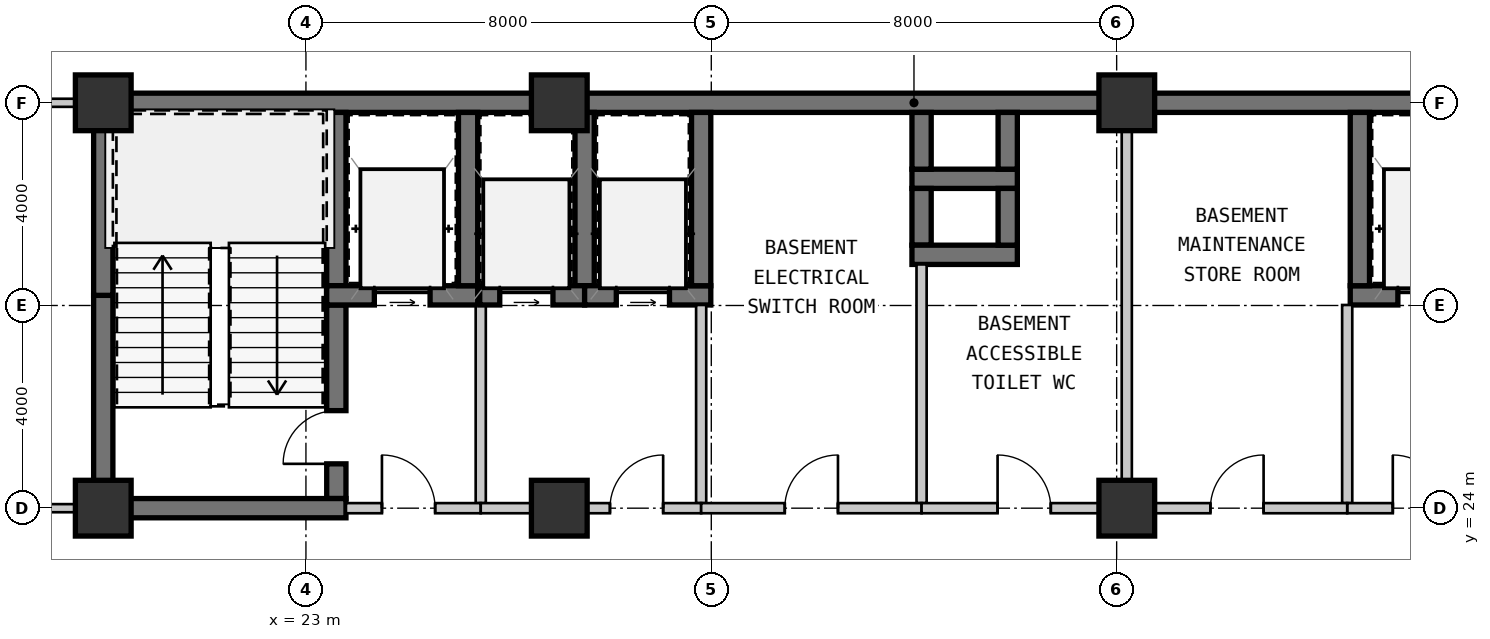
"""IFC4 building model, lengths in metres.
Left out: names, types, materials, properties, quantities, classifications, styles, units other than length and angle.
Written with IfcOpenShell. Run it as: python <this file> out.ifc"""

import sys

from ifc_helpers import new_model, si_unit, direction, frame, frame_2d, origin, origin_2d, place, context, subcontext, project, spatial, rectangle, extrude, source, transform, mapped, element, fill, save


model = new_model("IFC4")
c1 = context("Model", 3, precision=1e-05, world=origin(), true_north=direction((0.0, 1.0)))
c2 = subcontext(c1, "Body", "Model", "MODEL_VIEW")
j1 = project(units=[si_unit("LENGTHUNIT", "METRE"), si_unit("PLANEANGLEUNIT", "RADIAN")], contexts=[c1])
p1 = place(None, origin())
s1 = spatial("IfcSite", under=j1, at=p1, CompositionType="ELEMENT")
p2 = place(p1, origin())
s2 = spatial("IfcBuilding", under=s1, at=p2, CompositionType="ELEMENT")
p3 = place(p2, frame((0.0, 0.0, -4.0)))
s3 = spatial("IfcBuildingStorey", under=s2, at=p3, CompositionType="ELEMENT", Elevation=-4.0)
m1 = source(origin(), c2, "Body", "SweptSolid", [
    extrude(rectangle(XDim=1.1, YDim=1.1, at=origin_2d()), origin(), (0.0, 0.0, 1.0), 4.0),
])
for number, where, z_axis, x_axis in (
    (1, (19.0, 24.0, 0.0), (0.0, 0.0, 1.0), (1.0, 0.0, 0.0)),
    (2, (28.0, 24.0, 0.0), (0.0, 0.0, 1.0), (1.0, 0.0, 0.0)),
    (3, (39.2, 24.0, 0.0), (0.0, 0.0, 1.0), (1.0, 0.0, 0.0)),
    (4, (19.0, 32.0, 0.0), (0.0, 0.0, 1.0), (1.0, 0.0, 0.0)),
    (5, (28.0, 32.0, 0.0), (0.0, 0.0, 1.0), (1.0, 0.0, 0.0)),
    (6, (39.2, 32.0, 0.0), (0.0, 0.0, 1.0), (1.0, 0.0, 0.0)),
):
    element("IfcColumn", number, at=place(p3, frame(where, z_axis=z_axis, x_axis=x_axis)), inside=s3, PredefinedType="COLUMN", context=c2, shape_type="MappedRepresentation", body=[
        mapped(m1, transform((0.0, 0.0, 0.0), scale=1.0)),
    ])
m2 = source(origin(), c2, "Body", "SweptSolid", [
    extrude(rectangle(XDim=9.19, YDim=0.38, at=frame_2d((4.595, 0.0))), origin(), (0.0, 0.0, 1.0), 3.74),
])
p4 = place(p3, frame((18.81, 32.0, 0.0), z_axis=(0.0, 0.0, 1.0), x_axis=(1.0, 0.0, 0.0)))
e7 = element("IfcWall", 7, at=p4, inside=s3, PredefinedType="SHEAR", context=c2, shape_type="MappedRepresentation", body=[
    mapped(m2, transform((0.0, 0.0, 0.0), scale=1.0)),
])
m3 = source(origin(), c2, "Body", "SweptSolid", [
    extrude(rectangle(XDim=11.2, YDim=0.38, at=frame_2d((5.6, 0.0))), origin(), (0.0, 0.0, 1.0), 3.74),
])
p5 = place(p3, frame((28.0, 32.0, 0.0), z_axis=(0.0, 0.0, 1.0), x_axis=(1.0, 0.0, 0.0)))
e8 = element("IfcWall", 8, at=p5, inside=s3, PredefinedType="SHEAR", context=c2, shape_type="MappedRepresentation", body=[
    mapped(m3, transform((0.0, 0.0, 0.0), scale=1.0)),
])
m4 = source(origin(), c2, "Body", "SweptSolid", [
    extrude(rectangle(XDim=11.99, YDim=0.38, at=frame_2d((5.995, 0.0))), origin(), (0.0, 0.0, 1.0), 3.74),
])
p6 = place(p3, frame((39.2, 32.0, 0.0), z_axis=(0.0, 0.0, 1.0), x_axis=(1.0, 0.0, 0.0)))
e9 = element("IfcWall", 9, at=p6, inside=s3, PredefinedType="SHEAR", context=c2, shape_type="MappedRepresentation", body=[
    mapped(m4, transform((0.0, 0.0, 0.0), scale=1.0)),
])
m5 = source(origin(), c2, "Body", "SweptSolid", [
    extrude(rectangle(XDim=4.01, YDim=0.38, at=frame_2d((2.005, 0.0))), origin(), (0.0, 0.0, 1.0), 3.74),
])
p7 = place(p3, frame((19.0, 24.19, 0.0), z_axis=(0.0, 0.0, 1.0), x_axis=(0.0, 1.0, 0.0)))
e10 = element("IfcWall", 10, at=p7, inside=s3, PredefinedType="SHEAR", context=c2, shape_type="MappedRepresentation", body=[
    mapped(m5, transform((0.0, 0.0, 0.0), scale=1.0)),
])
m6 = source(origin(), c2, "Body", "SweptSolid", [
    extrude(rectangle(XDim=3.61, YDim=0.38, at=frame_2d((1.805, 0.0))), origin(), (0.0, 0.0, 1.0), 3.74),
])
p8 = place(p3, frame((19.0, 28.2, 0.0), z_axis=(0.0, 0.0, 1.0), x_axis=(0.0, 1.0, 0.0)))
e11 = element("IfcWall", 11, at=p8, inside=s3, PredefinedType="SHEAR", context=c2, shape_type="MappedRepresentation", body=[
    mapped(m6, transform((0.0, 0.0, 0.0), scale=1.0)),
])
m7 = source(origin(), c2, "Body", "SweptSolid", [
    extrude(rectangle(XDim=3.42, YDim=0.38, at=frame_2d((1.71, 0.0))), origin(), (0.0, 0.0, 1.0), 3.74),
])
p9 = place(p3, frame((23.6, 28.39, 0.0), z_axis=(0.0, 0.0, 1.0), x_axis=(0.0, 1.0, 0.0)))
e12 = element("IfcWall", 12, at=p9, inside=s3, PredefinedType="SHEAR", context=c2, shape_type="MappedRepresentation", body=[
    mapped(m7, transform((0.0, 0.0, 0.0), scale=1.0)),
])
m8 = source(origin(), c2, "Body", "SweptSolid", [
    extrude(rectangle(XDim=3.82, YDim=0.38, at=frame_2d((1.91, 0.0))), origin(), (0.0, 0.0, 1.0), 3.74),
])
p10 = place(p3, frame((23.6, 24.19, 0.0), z_axis=(0.0, 0.0, 1.0), x_axis=(0.0, 1.0, 0.0)))
e13 = element("IfcWall", 13, at=p10, inside=s3, PredefinedType="SHEAR", context=c2, shape_type="MappedRepresentation", body=[
    mapped(m8, transform((0.0, 0.0, 0.0), scale=1.0)),
])
m9 = source(origin(), c2, "Body", "SweptSolid", [
    extrude(rectangle(XDim=1.05, YDim=2.1, at=frame_2d((0.525, 1.05))), frame((0.0, 0.2, 0.0), z_axis=(0.0, -1.0, 0.0), x_axis=(1.0, 0.0, 0.0)), (0.0, 0.0, 1.0), 0.4),
])
p11 = place(p10, frame((0.685, 0.0, 0.0)))
e14 = element("IfcOpeningElement", 14, at=p11, cuts=e13, PredefinedType="OPENING", context=c2, shape_type="MappedRepresentation", body=[
    mapped(m9, transform((0.0, 0.0, 0.0), scale=1.0)),
])
m10 = source(origin(), c2, "Body", "SweptSolid", [
    extrude(rectangle(XDim=4.98, YDim=0.38, at=frame_2d((2.49, 0.0))), origin(), (0.0, 0.0, 1.0), 3.74),
])
p12 = place(p3, frame((18.81, 24.0, 0.0), z_axis=(0.0, 0.0, 1.0), x_axis=(1.0, 0.0, 0.0)))
e15 = element("IfcWall", 15, at=p12, inside=s3, PredefinedType="SHEAR", context=c2, shape_type="MappedRepresentation", body=[
    mapped(m10, transform((0.0, 0.0, 0.0), scale=1.0)),
])
m11 = source(origin(), c2, "Body", "SweptSolid", [
    extrude(rectangle(XDim=2.98, YDim=0.38, at=frame_2d((1.49, 0.0))), origin(), (0.0, 0.0, 1.0), 3.74),
])
p13 = place(p3, frame((23.41, 28.2, 0.0), z_axis=(0.0, 0.0, 1.0), x_axis=(1.0, 0.0, 0.0)))
e16 = element("IfcWall", 16, at=p13, inside=s3, PredefinedType="SHEAR", context=c2, shape_type="MappedRepresentation", body=[
    mapped(m11, transform((0.0, 0.0, 0.0), scale=1.0)),
])
m12 = source(origin(), c2, "Body", "SweptSolid", [
    extrude(rectangle(XDim=1.1, YDim=2.15, at=frame_2d((0.55, 1.075))), frame((0.0, 0.2, 0.0), z_axis=(0.0, -1.0, 0.0), x_axis=(1.0, 0.0, 0.0)), (0.0, 0.0, 1.0), 0.4),
])
p14 = place(p13, frame((0.94, 0.0, 0.0)))
e17 = element("IfcOpeningElement", 17, at=p14, cuts=e16, PredefinedType="OPENING", context=c2, shape_type="MappedRepresentation", body=[
    mapped(m12, transform((0.0, 0.0, 0.0), scale=1.0)),
])
p15 = place(p3, frame((26.2, 28.39, 0.0), z_axis=(0.0, 0.0, 1.0), x_axis=(0.0, 1.0, 0.0)))
e18 = element("IfcWall", 18, at=p15, inside=s3, PredefinedType="SHEAR", context=c2, shape_type="MappedRepresentation", body=[
    mapped(m7, transform((0.0, 0.0, 0.0), scale=1.0)),
])
m13 = source(origin(), c2, "Body", "SweptSolid", [
    extrude(rectangle(XDim=3.91, YDim=0.2, at=frame_2d((1.955, 0.0))), origin(), (0.0, 0.0, 1.0), 3.74),
])
p16 = place(p3, frame((26.45, 24.1, 0.0), z_axis=(0.0, 0.0, 1.0), x_axis=(0.0, 1.0, 0.0)))
e19 = element("IfcWall", 19, at=p16, inside=s3, PredefinedType="SOLIDWALL", context=c2, shape_type="MappedRepresentation", body=[
    mapped(m13, transform((0.0, 0.0, 0.0), scale=1.0)),
])
m14 = source(origin(), c2, "Body", "SweptSolid", [
    extrude(rectangle(XDim=2.66, YDim=0.2, at=frame_2d((1.33, 0.0))), origin(), (0.0, 0.0, 1.0), 3.28),
])
p17 = place(p3, frame((23.79, 24.0, 0.0), z_axis=(0.0, 0.0, 1.0), x_axis=(1.0, 0.0, 0.0)))
e20 = element("IfcWall", 20, at=p17, inside=s3, PredefinedType="SOLIDWALL", context=c2, shape_type="MappedRepresentation", body=[
    mapped(m14, transform((0.0, 0.0, 0.0), scale=1.0)),
])
m15 = source(origin(), c2, "Body", "SweptSolid", [
    extrude(rectangle(XDim=1.05, YDim=2.1, at=frame_2d((0.525, 1.05))), frame((0.0, 0.11, 0.0), z_axis=(0.0, -1.0, 0.0), x_axis=(1.0, 0.0, 0.0)), (0.0, 0.0, 1.0), 0.22),
])
p18 = place(p17, frame((0.71, 0.0, 0.0)))
e21 = element("IfcOpeningElement", 21, at=p18, cuts=e20, PredefinedType="OPENING", context=c2, shape_type="MappedRepresentation", body=[
    mapped(m15, transform((0.0, 0.0, 0.0), scale=1.0)),
])
p19 = place(p3, frame((43.61, 28.2, 0.0), z_axis=(0.0, 0.0, 1.0), x_axis=(1.0, 0.0, 0.0)))
e22 = element("IfcWall", 22, at=p19, inside=s3, PredefinedType="SHEAR", context=c2, shape_type="MappedRepresentation", body=[
    mapped(m11, transform((0.0, 0.0, 0.0), scale=1.0)),
])
p20 = place(p19, frame((0.94, 0.0, 0.0)))
e23 = element("IfcOpeningElement", 23, at=p20, cuts=e22, PredefinedType="OPENING", context=c2, shape_type="MappedRepresentation", body=[
    mapped(m12, transform((0.0, 0.0, 0.0), scale=1.0)),
])
p21 = place(p3, frame((43.8, 31.81, 0.0), z_axis=(0.0, 0.0, 1.0), x_axis=(0.0, -1.0, 0.0)))
e24 = element("IfcWall", 24, at=p21, inside=s3, PredefinedType="SHEAR", context=c2, shape_type="MappedRepresentation", body=[
    mapped(m7, transform((0.0, 0.0, 0.0), scale=1.0)),
])
p22 = place(p3, frame((43.55, 28.01, 0.0), z_axis=(0.0, 0.0, 1.0), x_axis=(0.0, -1.0, 0.0)))
e25 = element("IfcWall", 25, at=p22, inside=s3, PredefinedType="SOLIDWALL", context=c2, shape_type="MappedRepresentation", body=[
    mapped(m13, transform((0.0, 0.0, 0.0), scale=1.0)),
])
m16 = source(origin(), c2, "Body", "SweptSolid", [
    extrude(rectangle(XDim=2.66, YDim=0.2, at=frame_2d((1.33, 0.0))), origin(), (0.0, 0.0, 1.0), 3.207),
])
p23 = place(p3, frame((43.55, 24.0, 0.0), z_axis=(0.0, 0.0, 1.0), x_axis=(1.0, 0.0, 0.0)))
e26 = element("IfcWall", 26, at=p23, inside=s3, PredefinedType="SOLIDWALL", context=c2, shape_type="MappedRepresentation", body=[
    mapped(m16, transform((0.0, 0.0, 0.0), scale=1.0)),
])
p24 = place(p23, frame((0.9, 0.0, 0.0)))
e27 = element("IfcOpeningElement", 27, at=p24, cuts=e26, PredefinedType="OPENING", context=c2, shape_type="MappedRepresentation", body=[
    mapped(m15, transform((0.0, 0.0, 0.0), scale=1.0)),
])
m17 = source(origin(), c2, "Body", "SweptSolid", [
    extrude(rectangle(XDim=2.08, YDim=0.38, at=frame_2d((1.04, 0.0))), origin(), (0.0, 0.0, 1.0), 3.74),
])
p25 = place(p3, frame((34.96, 30.5, 0.0), z_axis=(0.0, 0.0, 1.0), x_axis=(1.0, 0.0, 0.0)))
e28 = element("IfcWall", 28, at=p25, inside=s3, PredefinedType="SHEAR", context=c2, shape_type="MappedRepresentation", body=[
    mapped(m17, transform((0.0, 0.0, 0.0), scale=1.0)),
])
m18 = source(origin(), c2, "Body", "SweptSolid", [
    extrude(rectangle(XDim=1.12, YDim=0.38, at=frame_2d((0.56, 0.0))), origin(), (0.0, 0.0, 1.0), 3.74),
])
for number, where, z_axis, x_axis in (
    (29, (35.15, 31.81, 0.0), (0.0, 0.0, 1.0), (0.0, -1.0, 0.0)),
    (30, (36.85, 30.69, 0.0), (0.0, 0.0, 1.0), (0.0, 1.0, 0.0)),
    (31, (35.15, 30.31, 0.0), (0.0, 0.0, 1.0), (0.0, -1.0, 0.0)),
):
    element("IfcWall", number, at=place(p3, frame(where, z_axis=z_axis, x_axis=x_axis)), inside=s3, PredefinedType="SHEAR", context=c2, shape_type="MappedRepresentation", body=[
        mapped(m18, transform((0.0, 0.0, 0.0), scale=1.0)),
    ])
p26 = place(p3, frame((34.96, 29.0, 0.0), z_axis=(0.0, 0.0, 1.0), x_axis=(1.0, 0.0, 0.0)))
e32 = element("IfcWall", 32, at=p26, inside=s3, PredefinedType="SHEAR", context=c2, shape_type="MappedRepresentation", body=[
    mapped(m17, transform((0.0, 0.0, 0.0), scale=1.0)),
])
p27 = place(p3, frame((36.85, 29.19, 0.0), z_axis=(0.0, 0.0, 1.0), x_axis=(0.0, 1.0, 0.0)))
e33 = element("IfcWall", 33, at=p27, inside=s3, PredefinedType="SHEAR", context=c2, shape_type="MappedRepresentation", body=[
    mapped(m18, transform((0.0, 0.0, 0.0), scale=1.0)),
])
p28 = place(p3, frame((28.5, 28.39, 0.0), z_axis=(0.0, 0.0, 1.0), x_axis=(0.0, 1.0, 0.0)))
e34 = element("IfcWall", 34, at=p28, inside=s3, PredefinedType="SHEAR", context=c2, shape_type="MappedRepresentation", body=[
    mapped(m7, transform((0.0, 0.0, 0.0), scale=1.0)),
])
m19 = source(origin(), c2, "Body", "SweptSolid", [
    extrude(rectangle(XDim=2.07, YDim=0.38, at=frame_2d((1.035, 0.0))), origin(), (0.0, 0.0, 1.0), 3.74),
])
p29 = place(p3, frame((26.43, 28.2, 0.0), z_axis=(0.0, 0.0, 1.0), x_axis=(1.0, 0.0, 0.0)))
e35 = element("IfcWall", 35, at=p29, inside=s3, PredefinedType="SHEAR", context=c2, shape_type="MappedRepresentation", body=[
    mapped(m19, transform((0.0, 0.0, 0.0), scale=1.0)),
])
m20 = source(origin(), c2, "Body", "SweptSolid", [
    extrude(rectangle(XDim=1.05, YDim=2.15, at=frame_2d((0.525, 1.075))), frame((0.0, 0.2, 0.0), z_axis=(0.0, -1.0, 0.0), x_axis=(1.0, 0.0, 0.0)), (0.0, 0.0, 1.0), 0.4),
])
p30 = place(p29, frame((0.395, 0.0, 0.0)))
e36 = element("IfcOpeningElement", 36, at=p30, cuts=e35, PredefinedType="OPENING", context=c2, shape_type="MappedRepresentation", body=[
    mapped(m20, transform((0.0, 0.0, 0.0), scale=1.0)),
])
m21 = source(origin(), c2, "Body", "SweptSolid", [
    extrude(rectangle(XDim=2.49, YDim=0.38, at=frame_2d((1.245, 0.0))), origin(), (0.0, 0.0, 1.0), 3.74),
])
p31 = place(p3, frame((28.5, 28.2, 0.0), z_axis=(0.0, 0.0, 1.0), x_axis=(1.0, 0.0, 0.0)))
e37 = element("IfcWall", 37, at=p31, inside=s3, PredefinedType="SHEAR", context=c2, shape_type="MappedRepresentation", body=[
    mapped(m21, transform((0.0, 0.0, 0.0), scale=1.0)),
])
p32 = place(p31, frame((0.625, 0.0, 0.0)))
e38 = element("IfcOpeningElement", 38, at=p32, cuts=e37, PredefinedType="OPENING", context=c2, shape_type="MappedRepresentation", body=[
    mapped(m20, transform((0.0, 0.0, 0.0), scale=1.0)),
])
p33 = place(p3, frame((30.8, 28.39, 0.0), z_axis=(0.0, 0.0, 1.0), x_axis=(0.0, 1.0, 0.0)))
e39 = element("IfcWall", 39, at=p33, inside=s3, PredefinedType="SHEAR", context=c2, shape_type="MappedRepresentation", body=[
    mapped(m7, transform((0.0, 0.0, 0.0), scale=1.0)),
])
p34 = place(p3, frame((30.8, 28.01, 0.0), z_axis=(0.0, 0.0, 1.0), x_axis=(0.0, -1.0, 0.0)))
e40 = element("IfcWall", 40, at=p34, inside=s3, PredefinedType="SOLIDWALL", context=c2, shape_type="MappedRepresentation", body=[
    mapped(m13, transform((0.0, 0.0, 0.0), scale=1.0)),
])
m22 = source(origin(), c2, "Body", "SweptSolid", [
    extrude(rectangle(XDim=4.35, YDim=0.2, at=frame_2d((2.175, 0.0))), origin(), (0.0, 0.0, 1.0), 3.28),
])
p35 = place(p3, frame((30.8, 24.0, 0.0), z_axis=(0.0, 0.0, 1.0), x_axis=(-1.0, 0.0, 0.0)))
e41 = element("IfcWall", 41, at=p35, inside=s3, PredefinedType="SOLIDWALL", context=c2, shape_type="MappedRepresentation", body=[
    mapped(m22, transform((0.0, 0.0, 0.0), scale=1.0)),
])
p36 = place(p35, frame((0.75, 0.0, 0.0)))
e42 = element("IfcOpeningElement", 42, at=p36, cuts=e41, PredefinedType="OPENING", context=c2, shape_type="MappedRepresentation", body=[
    mapped(m15, transform((0.0, 0.0, 0.0), scale=1.0)),
])
m23 = source(origin(), c2, "Body", "SweptSolid", [
    extrude(rectangle(XDim=4.71, YDim=0.2, at=frame_2d((2.355, 0.0))), origin(), (0.0, 0.0, 1.0), 3.74),
])
p37 = place(p3, frame((35.15, 28.81, 0.0), z_axis=(0.0, 0.0, 1.0), x_axis=(0.0, -1.0, 0.0)))
e43 = element("IfcWall", 43, at=p37, inside=s3, PredefinedType="SOLIDWALL", context=c2, shape_type="MappedRepresentation", body=[
    mapped(m23, transform((0.0, 0.0, 0.0), scale=1.0)),
])
m24 = source(origin(), c2, "Body", "SweptSolid", [
    extrude(rectangle(XDim=4.35, YDim=0.2, at=frame_2d((2.175, 0.0))), origin(), (0.0, 0.0, 1.0), 3.28),
])
p38 = place(p3, frame((35.15, 24.0, 0.0), z_axis=(0.0, 0.0, 1.0), x_axis=(-1.0, 0.0, 0.0)))
e44 = element("IfcWall", 44, at=p38, inside=s3, PredefinedType="SOLIDWALL", context=c2, shape_type="MappedRepresentation", body=[
    mapped(m24, transform((0.0, 0.0, 0.0), scale=1.0)),
])
p39 = place(p38, frame((1.65, 0.0, 0.0)))
e45 = element("IfcOpeningElement", 45, at=p39, cuts=e44, PredefinedType="OPENING", context=c2, shape_type="MappedRepresentation", body=[
    mapped(m15, transform((0.0, 0.0, 0.0), scale=1.0)),
])
m25 = source(origin(), c2, "Body", "SweptSolid", [
    extrude(rectangle(XDim=7.71, YDim=0.2, at=frame_2d((3.855, 0.0))), origin(), (0.0, 0.0, 1.0), 3.28),
])
p40 = place(p3, frame((39.2, 31.81, 0.0), z_axis=(0.0, 0.0, 1.0), x_axis=(0.0, -1.0, 0.0)))
e46 = element("IfcWall", 46, at=p40, inside=s3, PredefinedType="SOLIDWALL", context=c2, shape_type="MappedRepresentation", body=[
    mapped(m25, transform((0.0, 0.0, 0.0), scale=1.0)),
])
m26 = source(origin(), c2, "Body", "SweptSolid", [
    extrude(rectangle(XDim=4.05, YDim=0.2, at=frame_2d((2.025, 0.0))), origin(), (0.0, 0.0, 1.0), 3.28),
])
p41 = place(p3, frame((39.2, 24.0, 0.0), z_axis=(0.0, 0.0, 1.0), x_axis=(-1.0, 0.0, 0.0)))
e47 = element("IfcWall", 47, at=p41, inside=s3, PredefinedType="SOLIDWALL", context=c2, shape_type="MappedRepresentation", body=[
    mapped(m26, transform((0.0, 0.0, 0.0), scale=1.0)),
])
p42 = place(p41, frame((1.5, 0.0, 0.0)))
e48 = element("IfcOpeningElement", 48, at=p42, cuts=e47, PredefinedType="OPENING", context=c2, shape_type="MappedRepresentation", body=[
    mapped(m15, transform((0.0, 0.0, 0.0), scale=1.0)),
])
m27 = source(origin(), c2, "Body", "SweptSolid", [
    extrude(rectangle(XDim=4.35, YDim=0.2, at=frame_2d((2.175, 0.0))), origin(), (0.0, 0.0, 1.0), 3.207),
])
p43 = place(p3, frame((43.55, 24.0, 0.0), z_axis=(0.0, 0.0, 1.0), x_axis=(-1.0, 0.0, 0.0)))
e49 = element("IfcWall", 49, at=p43, inside=s3, PredefinedType="SOLIDWALL", context=c2, shape_type="MappedRepresentation", body=[
    mapped(m27, transform((0.0, 0.0, 0.0), scale=1.0)),
])
p44 = place(p43, frame((1.65, 0.0, 0.0)))
e50 = element("IfcOpeningElement", 50, at=p44, cuts=e49, PredefinedType="OPENING", context=c2, shape_type="MappedRepresentation", body=[
    mapped(m15, transform((0.0, 0.0, 0.0), scale=1.0)),
])
m28 = source(origin(), c2, "Body", "SweptSolid", [
    extrude(rectangle(XDim=10.93, YDim=0.16, at=frame_2d((5.465, 0.0))), origin(), (0.0, 0.0, 1.0), 3.74),
])
p45 = place(p3, frame((7.88, 24.0, 0.0), z_axis=(0.0, 0.0, 1.0), x_axis=(1.0, 0.0, 0.0)))
e51 = element("IfcWall", 51, at=p45, inside=s3, PredefinedType="PARTITIONING", context=c2, shape_type="MappedRepresentation", body=[
    mapped(m28, transform((0.0, 0.0, 0.0), scale=1.0)),
])
m29 = source(origin(), c2, "Body", "SweptSolid", [
    extrude(rectangle(XDim=3.79, YDim=0.16, at=frame_2d((1.895, 0.0))), origin(), (0.0, 0.0, 1.0), 3.207),
])
p46 = place(p3, frame((15.02, 32.0, 0.0), z_axis=(0.0, 0.0, 1.0), x_axis=(1.0, 0.0, 0.0)))
e52 = element("IfcWall", 52, at=p46, inside=s3, PredefinedType="PARTITIONING", context=c2, shape_type="MappedRepresentation", body=[
    mapped(m29, transform((0.0, 0.0, 0.0), scale=1.0)),
])
m30 = source(origin(), c2, "Body", "SweptSolid", [
    extrude(rectangle(XDim=1.05, YDim=2.1, at=frame_2d((0.525, 1.05))), frame((0.0, 0.025, 0.0), z_axis=(0.0, -1.0, 0.0), x_axis=(1.0, 0.0, 0.0)), (0.0, 0.0, 1.0), 0.05),
])
p47 = place(p11, origin())
e53 = element("IfcDoor", 53, at=p47, inside=s3, OperationType="SINGLE_SWING_LEFT", PredefinedType="DOOR", context=c2, shape_type="MappedRepresentation", body=[
    mapped(m30, transform((0.0, 0.0, 0.0), scale=1.0)),
])
fill(e14, e53)
m31 = source(origin(), c2, "Body", "SweptSolid", [
    extrude(rectangle(XDim=1.1, YDim=2.15, at=frame_2d((0.55, 1.075))), frame((0.0, 0.025, 0.0), z_axis=(0.0, -1.0, 0.0), x_axis=(1.0, 0.0, 0.0)), (0.0, 0.0, 1.0), 0.05),
])
p48 = place(p14, origin())
e54 = element("IfcDoor", 54, at=p48, inside=s3, OperationType="SLIDING_TO_LEFT", PredefinedType="DOOR", context=c2, shape_type="MappedRepresentation", body=[
    mapped(m31, transform((0.0, 0.0, 0.0), scale=1.0)),
])
fill(e17, e54)
p49 = place(p18, origin())
e55 = element("IfcDoor", 55, at=p49, inside=s3, OperationType="SINGLE_SWING_LEFT", PredefinedType="DOOR", context=c2, shape_type="MappedRepresentation", body=[
    mapped(m30, transform((0.0, 0.0, 0.0), scale=1.0)),
])
fill(e21, e55)
p50 = place(p20, origin())
e56 = element("IfcDoor", 56, at=p50, inside=s3, OperationType="SLIDING_TO_LEFT", PredefinedType="DOOR", context=c2, shape_type="MappedRepresentation", body=[
    mapped(m31, transform((0.0, 0.0, 0.0), scale=1.0)),
])
fill(e23, e56)
p51 = place(p24, origin())
e57 = element("IfcDoor", 57, at=p51, inside=s3, OperationType="SINGLE_SWING_LEFT", PredefinedType="DOOR", context=c2, shape_type="MappedRepresentation", body=[
    mapped(m30, transform((0.0, 0.0, 0.0), scale=1.0)),
])
fill(e27, e57)
m32 = source(origin(), c2, "Body", "SweptSolid", [
    extrude(rectangle(XDim=1.05, YDim=2.15, at=frame_2d((0.525, 1.075))), frame((0.0, 0.025, 0.0), z_axis=(0.0, -1.0, 0.0), x_axis=(1.0, 0.0, 0.0)), (0.0, 0.0, 1.0), 0.05),
])
p52 = place(p30, origin())
e58 = element("IfcDoor", 58, at=p52, inside=s3, OperationType="SLIDING_TO_LEFT", PredefinedType="DOOR", context=c2, shape_type="MappedRepresentation", body=[
    mapped(m32, transform((0.0, 0.0, 0.0), scale=1.0)),
])
fill(e36, e58)
p53 = place(p32, origin())
e59 = element("IfcDoor", 59, at=p53, inside=s3, OperationType="SLIDING_TO_LEFT", PredefinedType="DOOR", context=c2, shape_type="MappedRepresentation", body=[
    mapped(m32, transform((0.0, 0.0, 0.0), scale=1.0)),
])
fill(e38, e59)
p54 = place(p36, frame((1.05, 0.0, 0.0), z_axis=(0.0, 0.0, 1.0), x_axis=(-1.0, 0.0, 0.0)))
e60 = element("IfcDoor", 60, at=p54, inside=s3, OperationType="SINGLE_SWING_RIGHT", PredefinedType="DOOR", context=c2, shape_type="MappedRepresentation", body=[
    mapped(m30, transform((0.0, 0.0, 0.0), scale=1.0)),
])
fill(e42, e60)
p55 = place(p39, frame((1.05, 0.0, 0.0), z_axis=(0.0, 0.0, 1.0), x_axis=(-1.0, 0.0, 0.0)))
e61 = element("IfcDoor", 61, at=p55, inside=s3, OperationType="SINGLE_SWING_RIGHT", PredefinedType="DOOR", context=c2, shape_type="MappedRepresentation", body=[
    mapped(m30, transform((0.0, 0.0, 0.0), scale=1.0)),
])
fill(e45, e61)
p56 = place(p42, frame((1.05, 0.0, 0.0), z_axis=(0.0, 0.0, 1.0), x_axis=(-1.0, 0.0, 0.0)))
e62 = element("IfcDoor", 62, at=p56, inside=s3, OperationType="SINGLE_SWING_LEFT", PredefinedType="DOOR", context=c2, shape_type="MappedRepresentation", body=[
    mapped(m30, transform((0.0, 0.0, 0.0), scale=1.0)),
])
fill(e48, e62)
p57 = place(p44, frame((1.05, 0.0, 0.0), z_axis=(0.0, 0.0, 1.0), x_axis=(-1.0, 0.0, 0.0)))
e63 = element("IfcDoor", 63, at=p57, inside=s3, OperationType="SINGLE_SWING_RIGHT", PredefinedType="DOOR", context=c2, shape_type="MappedRepresentation", body=[
    mapped(m30, transform((0.0, 0.0, 0.0), scale=1.0)),
])
fill(e50, e63)
save(model, sys.argv[1])
